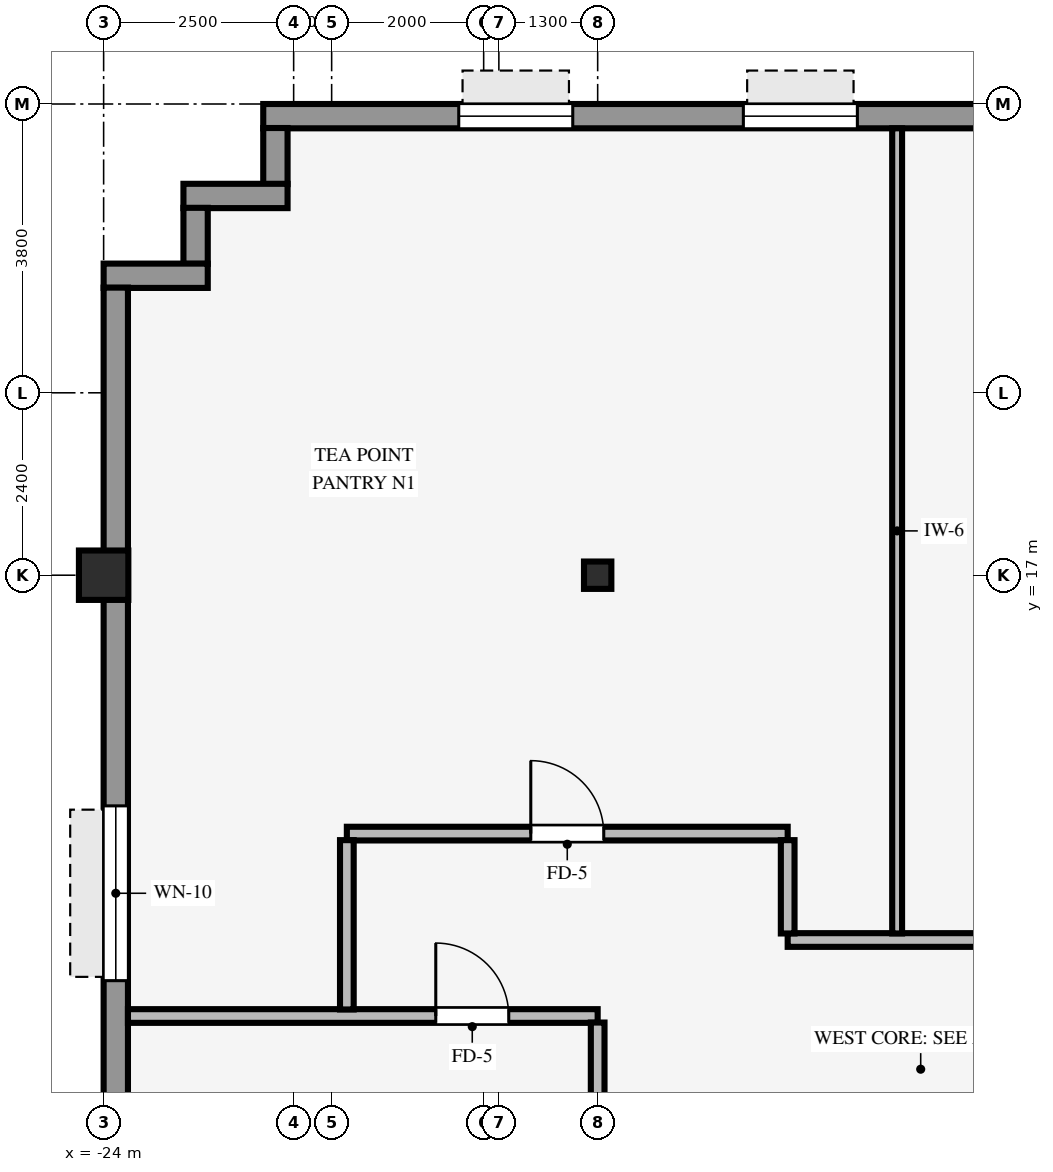
"""IFC4 building model, lengths in metres.
Left out: names, types, materials, properties, quantities, classifications, styles, units other than length and angle.
Written with IfcOpenShell. Run it as: python <this file> out.ifc"""

import sys

from ifc_helpers import new_model, si_unit, direction, frame, frame_2d, origin, origin_2d, place, context, subcontext, project, spatial, rectangle, hollow_rectangle, i_section, extrude, source, transform, mapped, element, fill, save


model = new_model("IFC4")
c1 = context("Model", 3, precision=1e-05, world=origin(), true_north=direction((0.0, 1.0)))
c2 = subcontext(c1, "Body", "Model", "MODEL_VIEW")
j1 = project(units=[si_unit("LENGTHUNIT", "METRE"), si_unit("PLANEANGLEUNIT", "RADIAN")], contexts=[c1])
p1 = place(None, origin())
s1 = spatial("IfcSite", under=j1, at=p1, CompositionType="ELEMENT")
p2 = place(p1, origin())
s2 = spatial("IfcBuilding", under=s1, at=p2, CompositionType="ELEMENT")
p3 = place(p2, frame((0.0, 0.0, 112.9)))
s3 = spatial("IfcBuildingStorey", under=s2, at=p3, CompositionType="ELEMENT", Elevation=112.9)
p4 = place(p3, frame((-24.0, 17.0, 0.0), z_axis=(0.0, 0.0, 1.0), x_axis=(1.0, 0.0, 0.0)))
e1 = element("IfcColumn", 1, at=p4, inside=s3, PredefinedType="COLUMN", context=c2, shape_type="SweptSolid", body=[
    extrude(hollow_rectangle(XDim=0.65, YDim=0.65, WallThickness=0.04, InnerFilletRadius=0.04, OuterFilletRadius=0.08, at=origin_2d()), origin(), (0.0, 0.0, 1.0), 3.25),
])
p5 = place(p3, frame((-17.5, 17.0, 0.0), z_axis=(0.0, 0.0, 1.0), x_axis=(1.0, 0.0, 0.0)))
e2 = element("IfcColumn", 2, at=p5, inside=s3, PredefinedType="COLUMN", context=c2, shape_type="SweptSolid", body=[
    extrude(i_section(OverallWidth=0.36, OverallDepth=0.36, WebThickness=0.021, FlangeThickness=0.021, FilletRadius=0.018, at=origin_2d()), origin(), (0.0, 0.0, 1.0), 3.25),
])
p6 = place(p3, frame((-21.9, 23.04, 0.0), z_axis=(0.0, 0.0, 1.0), x_axis=(1.0, 0.0, 0.0)))
e3 = element("IfcWall", 3, at=p6, inside=s3, PredefinedType="STANDARD", context=c2, shape_type="SweptSolid", body=[
    extrude(rectangle(XDim=43.8, YDim=0.32, at=frame_2d((21.9, 0.0))), origin(), (0.0, 0.0, 1.0), 2.585),
])
p7 = place(p6, frame((2.572, 0.0, 0.8)))
e4 = element("IfcOpeningElement", 4, at=p7, cuts=e3, PredefinedType="OPENING", context=c2, shape_type="SweptSolid", body=[
    extrude(rectangle(XDim=1.5, YDim=1.6, at=frame_2d((0.75, 0.8))), frame((0.0, 0.17, 0.0), z_axis=(0.0, -1.0, 0.0), x_axis=(1.0, 0.0, 0.0)), (0.0, 0.0, 1.0), 0.34),
])
p8 = place(p6, frame((6.317, 0.0, 0.8)))
e5 = element("IfcOpeningElement", 5, at=p8, cuts=e3, PredefinedType="OPENING", context=c2, shape_type="SweptSolid", body=[
    extrude(rectangle(XDim=1.5, YDim=1.6, at=frame_2d((0.75, 0.8))), frame((0.0, 0.17, 0.0), z_axis=(0.0, -1.0, 0.0), x_axis=(1.0, 0.0, 0.0)), (0.0, 0.0, 1.0), 0.34),
])
p9 = place(p6, frame((10.511, 0.0, 0.8)))
e6 = element("IfcOpeningElement", 6, at=p9, cuts=e3, PredefinedType="OPENING", context=c2, shape_type="SweptSolid", body=[
    extrude(rectangle(XDim=1.5, YDim=1.6, at=frame_2d((0.75, 0.8))), frame((0.0, 0.17, 0.0), z_axis=(0.0, -1.0, 0.0), x_axis=(1.0, 0.0, 0.0)), (0.0, 0.0, 1.0), 0.34),
])
p10 = place(p6, frame((16.956, 0.0, 0.8)))
e7 = element("IfcOpeningElement", 7, at=p10, cuts=e3, PredefinedType="OPENING", context=c2, shape_type="SweptSolid", body=[
    extrude(rectangle(XDim=1.5, YDim=1.6, at=frame_2d((0.75, 0.8))), frame((0.0, 0.17, 0.0), z_axis=(0.0, -1.0, 0.0), x_axis=(1.0, 0.0, 0.0)), (0.0, 0.0, 1.0), 0.34),
])
p11 = place(p6, frame((24.894, 0.0, 0.8)))
e8 = element("IfcOpeningElement", 8, at=p11, cuts=e3, PredefinedType="OPENING", context=c2, shape_type="SweptSolid", body=[
    extrude(rectangle(XDim=1.5, YDim=1.6, at=frame_2d((0.75, 0.8))), frame((0.0, 0.17, 0.0), z_axis=(0.0, -1.0, 0.0), x_axis=(1.0, 0.0, 0.0)), (0.0, 0.0, 1.0), 0.34),
])
p12 = place(p6, frame((35.083, 0.0, 0.8)))
e9 = element("IfcOpeningElement", 9, at=p12, cuts=e3, PredefinedType="OPENING", context=c2, shape_type="SweptSolid", body=[
    extrude(rectangle(XDim=1.5, YDim=1.6, at=frame_2d((0.75, 0.8))), frame((0.0, 0.17, 0.0), z_axis=(0.0, -1.0, 0.0), x_axis=(1.0, 0.0, 0.0)), (0.0, 0.0, 1.0), 0.34),
])
p13 = place(p6, frame((39.728, 0.0, 0.8)))
e10 = element("IfcOpeningElement", 10, at=p13, cuts=e3, PredefinedType="OPENING", context=c2, shape_type="SweptSolid", body=[
    extrude(rectangle(XDim=1.5, YDim=1.6, at=frame_2d((0.75, 0.8))), frame((0.0, 0.17, 0.0), z_axis=(0.0, -1.0, 0.0), x_axis=(1.0, 0.0, 0.0)), (0.0, 0.0, 1.0), 0.34),
])
p14 = place(p3, frame((-21.74, 22.146, 0.0), z_axis=(0.0, 0.0, 1.0), x_axis=(0.0, 1.0, 0.0)))
e11 = element("IfcWall", 11, at=p14, inside=s3, PredefinedType="STANDARD", context=c2, shape_type="SweptSolid", body=[
    extrude(rectangle(XDim=0.738, YDim=0.32, at=frame_2d((0.369, 0.0))), origin(), (0.0, 0.0, 1.0), 3.24),
])
p15 = place(p3, frame((-22.95, 21.99, 0.0), z_axis=(0.0, 0.0, 1.0), x_axis=(1.0, 0.0, 0.0)))
e12 = element("IfcWall", 12, at=p15, inside=s3, PredefinedType="STANDARD", context=c2, shape_type="SweptSolid", body=[
    extrude(rectangle(XDim=1.37, YDim=0.32, at=frame_2d((0.685, 0.0))), origin(), (0.0, 0.0, 1.0), 3.24),
])
p16 = place(p3, frame((-22.79, 21.096, 0.0), z_axis=(0.0, 0.0, 1.0), x_axis=(0.0, 1.0, 0.0)))
e13 = element("IfcWall", 13, at=p16, inside=s3, PredefinedType="STANDARD", context=c2, shape_type="SweptSolid", body=[
    extrude(rectangle(XDim=0.738, YDim=0.32, at=frame_2d((0.369, 0.0))), origin(), (0.0, 0.0, 1.0), 3.24),
])
p17 = place(p3, frame((-24.0, 20.94, 0.0), z_axis=(0.0, 0.0, 1.0), x_axis=(1.0, 0.0, 0.0)))
e14 = element("IfcWall", 14, at=p17, inside=s3, PredefinedType="STANDARD", context=c2, shape_type="SweptSolid", body=[
    extrude(rectangle(XDim=1.37, YDim=0.32, at=frame_2d((0.685, 0.0))), origin(), (0.0, 0.0, 1.0), 3.24),
])
p18 = place(p3, frame((-23.84, -20.784, 0.0), z_axis=(0.0, 0.0, 1.0), x_axis=(0.0, 1.0, 0.0)))
e15 = element("IfcWall", 15, at=p18, inside=s3, PredefinedType="STANDARD", context=c2, shape_type="SweptSolid", body=[
    extrude(rectangle(XDim=41.568, YDim=0.32, at=frame_2d((20.784, 0.0))), origin(), (0.0, 0.0, 1.0), 3.24),
])
p19 = place(p18, frame((6.819, 0.0, 0.8)))
e16 = element("IfcOpeningElement", 16, at=p19, cuts=e15, PredefinedType="OPENING", context=c2, shape_type="SweptSolid", body=[
    extrude(rectangle(XDim=2.3, YDim=1.62, at=frame_2d((1.15, 0.81))), frame((0.0, 0.17, 0.0), z_axis=(0.0, -1.0, 0.0), x_axis=(1.0, 0.0, 0.0)), (0.0, 0.0, 1.0), 0.34),
])
p20 = place(p18, frame((17.161, 0.0, 0.8)))
e17 = element("IfcOpeningElement", 17, at=p20, cuts=e15, PredefinedType="OPENING", context=c2, shape_type="SweptSolid", body=[
    extrude(rectangle(XDim=2.3, YDim=1.62, at=frame_2d((1.15, 0.81))), frame((0.0, 0.17, 0.0), z_axis=(0.0, -1.0, 0.0), x_axis=(1.0, 0.0, 0.0)), (0.0, 0.0, 1.0), 0.34),
])
p21 = place(p18, frame((32.449, 0.0, 0.8)))
e18 = element("IfcOpeningElement", 18, at=p21, cuts=e15, PredefinedType="OPENING", context=c2, shape_type="SweptSolid", body=[
    extrude(rectangle(XDim=2.3, YDim=1.62, at=frame_2d((1.15, 0.81))), frame((0.0, 0.17, 0.0), z_axis=(0.0, -1.0, 0.0), x_axis=(1.0, 0.0, 0.0)), (0.0, 0.0, 1.0), 0.34),
])
p22 = place(p3, frame((-23.68, 11.2, 0.0), z_axis=(0.0, 0.0, 1.0), x_axis=(1.0, 0.0, 0.0)))
e19 = element("IfcWall", 19, at=p22, inside=s3, PredefinedType="PARTITIONING", context=c2, shape_type="SweptSolid", body=[
    extrude(rectangle(XDim=6.18, YDim=0.18, at=frame_2d((3.09, 0.0))), origin(), (0.0, 0.0, 1.0), 3.24),
])
p23 = place(p22, frame((4.05, 0.0, 0.0)))
e20 = element("IfcOpeningElement", 20, at=p23, cuts=e19, PredefinedType="OPENING", context=c2, shape_type="SweptSolid", body=[
    extrude(rectangle(XDim=0.96, YDim=2.1, at=frame_2d((0.48, 1.05))), frame((0.0, 0.1, 0.0), z_axis=(0.0, -1.0, 0.0), x_axis=(1.0, 0.0, 0.0)), (0.0, 0.0, 1.0), 0.2),
])
p24 = place(p3, frame((-15.0, 12.2, 0.0), z_axis=(0.0, 0.0, 1.0), x_axis=(1.0, 0.0, 0.0)))
e21 = element("IfcWall", 21, at=p24, inside=s3, PredefinedType="PARTITIONING", context=c2, shape_type="SweptSolid", body=[
    extrude(rectangle(XDim=30.0, YDim=0.18, at=frame_2d((15.0, 0.0))), origin(), (0.0, 0.0, 1.0), 3.24),
])
p25 = place(p24, frame((4.905, 0.0, 0.0)))
e22 = element("IfcOpeningElement", 22, at=p25, cuts=e21, PredefinedType="OPENING", context=c2, shape_type="SweptSolid", body=[
    extrude(rectangle(XDim=0.96, YDim=2.1, at=frame_2d((0.48, 1.05))), frame((0.0, 0.1, 0.0), z_axis=(0.0, -1.0, 0.0), x_axis=(1.0, 0.0, 0.0)), (0.0, 0.0, 1.0), 0.2),
])
p26 = place(p24, frame((16.695, 0.0, 0.0)))
e23 = element("IfcOpeningElement", 23, at=p26, cuts=e21, PredefinedType="OPENING", context=c2, shape_type="SweptSolid", body=[
    extrude(rectangle(XDim=0.96, YDim=2.1, at=frame_2d((0.48, 1.05))), frame((0.0, 0.1, 0.0), z_axis=(0.0, -1.0, 0.0), x_axis=(1.0, 0.0, 0.0)), (0.0, 0.0, 1.0), 0.2),
])
p27 = place(p24, frame((22.15, 0.0, 0.0)))
e24 = element("IfcOpeningElement", 24, at=p27, cuts=e21, PredefinedType="OPENING", context=c2, shape_type="SweptSolid", body=[
    extrude(rectangle(XDim=0.96, YDim=2.1, at=frame_2d((0.48, 1.05))), frame((0.0, 0.1, 0.0), z_axis=(0.0, -1.0, 0.0), x_axis=(1.0, 0.0, 0.0)), (0.0, 0.0, 1.0), 0.2),
])
p28 = place(p24, frame((27.075, 0.0, 0.0)))
e25 = element("IfcOpeningElement", 25, at=p28, cuts=e21, PredefinedType="OPENING", context=c2, shape_type="SweptSolid", body=[
    extrude(rectangle(XDim=0.96, YDim=2.1, at=frame_2d((0.48, 1.05))), frame((0.0, 0.1, 0.0), z_axis=(0.0, -1.0, 0.0), x_axis=(1.0, 0.0, 0.0)), (0.0, 0.0, 1.0), 0.2),
])
p29 = place(p24, frame((10.085, 0.0, 0.0)))
e26 = element("IfcOpeningElement", 26, at=p29, cuts=e21, PredefinedType="OPENING", context=c2, shape_type="SweptSolid", body=[
    extrude(rectangle(XDim=0.96, YDim=2.1, at=frame_2d((0.48, 1.05))), frame((0.0, 0.1, 0.0), z_axis=(0.0, -1.0, 0.0), x_axis=(1.0, 0.0, 0.0)), (0.0, 0.0, 1.0), 0.2),
])
p30 = place(p3, frame((-20.8, 13.6, 0.0), z_axis=(0.0, 0.0, 1.0), x_axis=(1.0, 0.0, 0.0)))
e27 = element("IfcWall", 27, at=p30, inside=s3, PredefinedType="PARTITIONING", context=c2, shape_type="SweptSolid", body=[
    extrude(rectangle(XDim=5.8, YDim=0.18, at=frame_2d((2.9, 0.0))), origin(), (0.0, 0.0, 1.0), 2.878),
])
p31 = place(p30, frame((2.42, 0.0, 0.0)))
e28 = element("IfcOpeningElement", 28, at=p31, cuts=e27, PredefinedType="OPENING", context=c2, shape_type="SweptSolid", body=[
    extrude(rectangle(XDim=0.96, YDim=2.1, at=frame_2d((0.48, 1.05))), frame((0.0, 0.1, 0.0), z_axis=(0.0, -1.0, 0.0), x_axis=(1.0, 0.0, 0.0)), (0.0, 0.0, 1.0), 0.2),
])
p32 = place(p3, frame((-20.8, 11.286, 0.0), z_axis=(0.0, 0.0, 1.0), x_axis=(0.0, 1.0, 0.0)))
e29 = element("IfcWall", 29, at=p32, inside=s3, PredefinedType="PARTITIONING", context=c2, shape_type="SweptSolid", body=[
    extrude(rectangle(XDim=2.228, YDim=0.18, at=frame_2d((1.114, 0.0))), origin(), (0.0, 0.0, 1.0), 3.24),
])
p33 = place(p3, frame((-17.5, 10.146, 0.0), z_axis=(0.0, 0.0, 1.0), x_axis=(0.0, 1.0, 0.0)))
e30 = element("IfcWall", 30, at=p33, inside=s3, PredefinedType="PARTITIONING", context=c2, shape_type="SweptSolid", body=[
    extrude(rectangle(XDim=0.968, YDim=0.18, at=frame_2d((0.484, 0.0))), origin(), (0.0, 0.0, 1.0), 2.618),
])
p34 = place(p3, frame((-15.0, 12.286, 0.0), z_axis=(0.0, 0.0, 1.0), x_axis=(0.0, 1.0, 0.0)))
e31 = element("IfcWall", 31, at=p34, inside=s3, PredefinedType="PARTITIONING", context=c2, shape_type="SweptSolid", body=[
    extrude(rectangle(XDim=1.228, YDim=0.18, at=frame_2d((0.614, 0.0))), origin(), (0.0, 0.0, 1.0), 3.24),
])
p35 = place(p3, frame((-13.56, 12.286, 0.0), z_axis=(0.0, 0.0, 1.0), x_axis=(0.0, 1.0, 0.0)))
e32 = element("IfcWall", 32, at=p35, inside=s3, PredefinedType="PARTITIONING", context=c2, shape_type="SweptSolid", body=[
    extrude(rectangle(XDim=10.594, YDim=0.13, at=frame_2d((5.297, 0.0))), origin(), (0.0, 0.0, 1.0), 3.24),
])
m1 = source(origin(), c2, "Body", "SweptSolid", [
    extrude(rectangle(XDim=1.5, YDim=1.6, at=frame_2d((0.75, 0.8))), frame((0.0, 0.03, 0.0), z_axis=(0.0, -1.0, 0.0), x_axis=(1.0, 0.0, 0.0)), (0.0, 0.0, 1.0), 0.06),
])
p36 = place(p7, origin())
e33 = element("IfcWindow", 33, at=p36, inside=s3, PartitioningType="SINGLE_PANEL", PredefinedType="WINDOW", context=c2, shape_type="MappedRepresentation", body=[
    mapped(m1, transform((0.0, 0.0, 0.0), scale=1.0)),
])
fill(e4, e33)
p37 = place(p8, origin())
e34 = element("IfcWindow", 34, at=p37, inside=s3, PartitioningType="SINGLE_PANEL", PredefinedType="WINDOW", context=c2, shape_type="MappedRepresentation", body=[
    mapped(m1, transform((0.0, 0.0, 0.0), scale=1.0)),
])
fill(e5, e34)
m2 = source(origin(), c2, "Body", "SweptSolid", [
    extrude(rectangle(XDim=2.3, YDim=1.62, at=frame_2d((1.15, 0.81))), frame((0.0, 0.03, 0.0), z_axis=(0.0, -1.0, 0.0), x_axis=(1.0, 0.0, 0.0)), (0.0, 0.0, 1.0), 0.06),
])
p38 = place(p21, origin())
e35 = element("IfcWindow", 35, at=p38, inside=s3, PartitioningType="SINGLE_PANEL", PredefinedType="WINDOW", context=c2, shape_type="MappedRepresentation", body=[
    mapped(m2, transform((0.0, 0.0, 0.0), scale=1.0)),
])
fill(e18, e35)
m3 = source(origin(), c2, "Body", "SweptSolid", [
    extrude(rectangle(XDim=0.96, YDim=2.1, at=frame_2d((0.48, 1.05))), frame((0.0, 0.025, 0.0), z_axis=(0.0, -1.0, 0.0), x_axis=(1.0, 0.0, 0.0)), (0.0, 0.0, 1.0), 0.05),
])
p39 = place(p31, origin())
e36 = element("IfcDoor", 36, at=p39, inside=s3, OperationType="SINGLE_SWING_LEFT", PredefinedType="DOOR", context=c2, shape_type="MappedRepresentation", body=[
    mapped(m3, transform((0.0, 0.0, 0.0), scale=1.0)),
])
fill(e28, e36)
p40 = place(p23, origin())
e37 = element("IfcDoor", 37, at=p40, inside=s3, OperationType="SINGLE_SWING_LEFT", PredefinedType="DOOR", context=c2, shape_type="MappedRepresentation", body=[
    mapped(m3, transform((0.0, 0.0, 0.0), scale=1.0)),
])
fill(e20, e37)
save(model, sys.argv[1])
